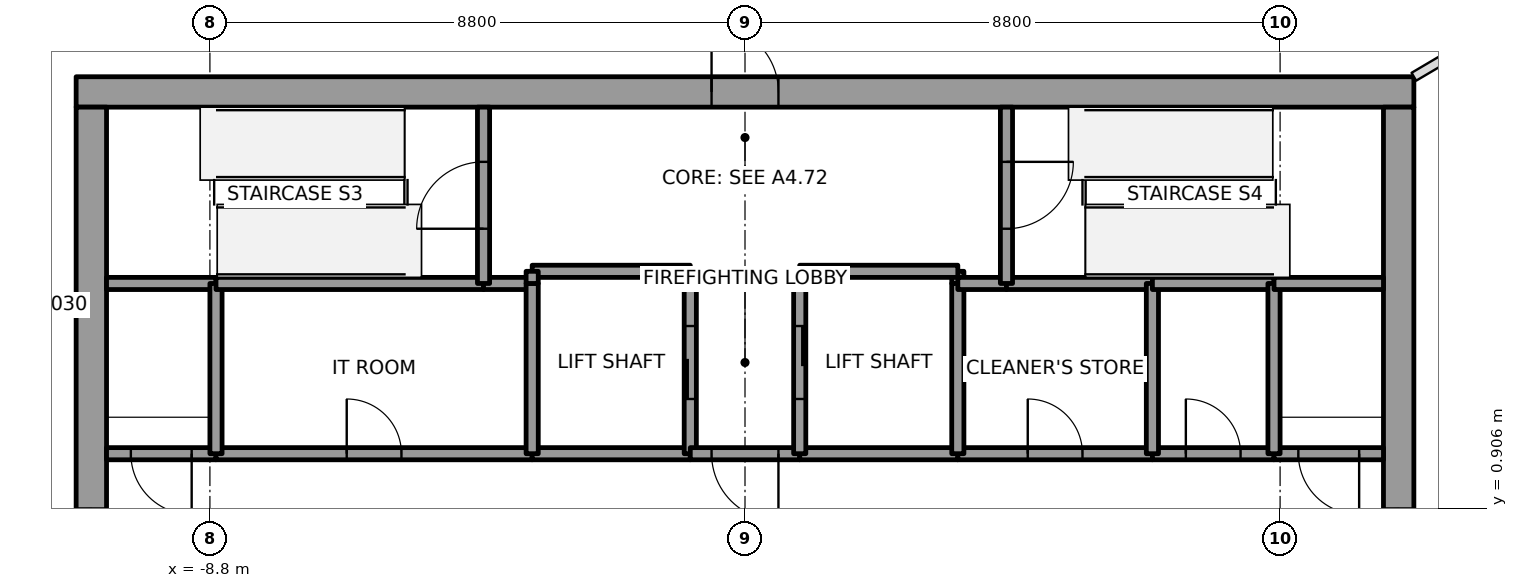
"""IFC4 building model, lengths in metres.
Left out: names, types, materials, properties, quantities, classifications, styles, units other than length and angle.
Written with IfcOpenShell. Run it as: python <this file> out.ifc"""

import sys

from ifc_helpers import new_model, si_unit, direction, frame, frame_2d, origin, place, context, subcontext, project, spatial, rectangle, extrude, element, fill, save


model = new_model("IFC4")
c1 = context("Model", 3, precision=1e-05, world=origin(), true_north=direction((0.0, 1.0)))
c2 = subcontext(c1, "Body", "Model", "MODEL_VIEW")
j1 = project(units=[si_unit("LENGTHUNIT", "METRE"), si_unit("PLANEANGLEUNIT", "RADIAN")], contexts=[c1])
p1 = place(None, origin())
s1 = spatial("IfcSite", under=j1, at=p1, CompositionType="ELEMENT")
p2 = place(p1, origin())
s2 = spatial("IfcBuilding", under=s1, at=p2, CompositionType="ELEMENT")
p3 = place(p2, frame((0.0, 0.0, 307.0)))
s3 = spatial("IfcBuildingStorey", under=s2, at=p3, CompositionType="ELEMENT", Elevation=307.0)
p4 = place(p3, frame((-11.0, 7.75, 0.0), z_axis=(0.0, 0.0, 1.0), x_axis=(1.0, 0.0, 0.0)))
e1 = element("IfcWall", 1, at=p4, inside=s3, PredefinedType="SHEAR", context=c2, shape_type="SweptSolid", body=[
    extrude(rectangle(XDim=22.0, YDim=0.5, at=frame_2d((11.0, 0.0))), origin(), (0.0, 0.0, 1.0), 4.0),
])
p5 = place(p4, frame((10.45, 0.0, 0.0)))
e2 = element("IfcOpeningElement", 2, at=p5, cuts=e1, PredefinedType="OPENING", context=c2, shape_type="SweptSolid", body=[
    extrude(rectangle(XDim=1.1, YDim=2.1, at=frame_2d((0.55, 1.05))), frame((0.0, 0.25, 0.0), z_axis=(0.0, -1.0, 0.0), x_axis=(1.0, 0.0, 0.0)), (0.0, 0.0, 1.0), 0.5),
])
p6 = place(p3, frame((-10.75, -7.5, 0.0), z_axis=(0.0, 0.0, 1.0), x_axis=(0.0, 1.0, 0.0)))
e3 = element("IfcWall", 3, at=p6, inside=s3, PredefinedType="SHEAR", context=c2, shape_type="SweptSolid", body=[
    extrude(rectangle(XDim=15.0, YDim=0.5, at=frame_2d((7.5, 0.0))), origin(), (0.0, 0.0, 1.0), 4.0),
])
p7 = place(p6, frame((6.6, 0.0, 0.0)))
e4 = element("IfcOpeningElement", 4, at=p7, cuts=e3, PredefinedType="OPENING", context=c2, shape_type="SweptSolid", body=[
    extrude(rectangle(XDim=1.8, YDim=2.1, at=frame_2d((0.9, 1.05))), frame((0.0, 0.25, 0.0), z_axis=(0.0, -1.0, 0.0), x_axis=(1.0, 0.0, 0.0)), (0.0, 0.0, 1.0), 0.5),
])
p8 = place(p3, frame((10.75, -7.5, 0.0), z_axis=(0.0, 0.0, 1.0), x_axis=(0.0, 1.0, 0.0)))
e5 = element("IfcWall", 5, at=p8, inside=s3, PredefinedType="SHEAR", context=c2, shape_type="SweptSolid", body=[
    extrude(rectangle(XDim=15.0, YDim=0.5, at=frame_2d((7.5, 0.0))), origin(), (0.0, 0.0, 1.0), 4.0),
])
p9 = place(p8, frame((6.6, 0.0, 0.0)))
e6 = element("IfcOpeningElement", 6, at=p9, cuts=e5, PredefinedType="OPENING", context=c2, shape_type="SweptSolid", body=[
    extrude(rectangle(XDim=1.8, YDim=2.1, at=frame_2d((0.9, 1.05))), frame((0.0, 0.25, 0.0), z_axis=(0.0, -1.0, 0.0), x_axis=(1.0, 0.0, 0.0)), (0.0, 0.0, 1.0), 0.5),
])
p10 = place(p3, frame((-8.7, 1.8, 0.0), z_axis=(0.0, 0.0, 1.0), x_axis=(-1.0, 0.0, 0.0)))
e7 = element("IfcWall", 7, at=p10, inside=s3, PredefinedType="SOLIDWALL", context=c2, shape_type="SweptSolid", body=[
    extrude(rectangle(XDim=1.8, YDim=0.2, at=frame_2d((0.9, 0.0))), origin(), (0.0, 0.0, 1.0), 3.85),
])
p11 = place(p10, frame((0.4, 0.0, 0.0)))
e8 = element("IfcOpeningElement", 8, at=p11, cuts=e7, PredefinedType="OPENING", context=c2, shape_type="SweptSolid", body=[
    extrude(rectangle(XDim=1.0, YDim=2.1, at=frame_2d((0.5, 1.05))), frame((0.0, 0.1, 0.0), z_axis=(0.0, -1.0, 0.0), x_axis=(1.0, 0.0, 0.0)), (0.0, 0.0, 1.0), 0.2),
])
p12 = place(p3, frame((-8.7, 4.6, 0.0), z_axis=(0.0, 0.0, 1.0), x_axis=(-1.0, 0.0, 0.0)))
e9 = element("IfcWall", 9, at=p12, inside=s3, PredefinedType="SOLIDWALL", context=c2, shape_type="SweptSolid", body=[
    extrude(rectangle(XDim=1.8, YDim=0.2, at=frame_2d((0.9, 0.0))), origin(), (0.0, 0.0, 1.0), 3.85),
])
p13 = place(p3, frame((-8.7, 1.8, 0.0), z_axis=(0.0, 0.0, 1.0), x_axis=(1.0, 0.0, 0.0)))
e10 = element("IfcWall", 10, at=p13, inside=s3, PredefinedType="SOLIDWALL", context=c2, shape_type="SweptSolid", body=[
    extrude(rectangle(XDim=5.2, YDim=0.2, at=frame_2d((2.6, 0.0))), origin(), (0.0, 0.0, 1.0), 3.85),
])
p14 = place(p13, frame((2.15, 0.0, 0.0)))
e11 = element("IfcOpeningElement", 11, at=p14, cuts=e10, PredefinedType="OPENING", context=c2, shape_type="SweptSolid", body=[
    extrude(rectangle(XDim=0.9, YDim=2.1, at=frame_2d((0.45, 1.05))), frame((0.0, 0.1, 0.0), z_axis=(0.0, -1.0, 0.0), x_axis=(1.0, 0.0, 0.0)), (0.0, 0.0, 1.0), 0.2),
])
p15 = place(p3, frame((-8.7, 4.6, 0.0), z_axis=(0.0, 0.0, 1.0), x_axis=(0.0, -1.0, 0.0)))
e12 = element("IfcWall", 12, at=p15, inside=s3, PredefinedType="SOLIDWALL", context=c2, shape_type="SweptSolid", body=[
    extrude(rectangle(XDim=2.8, YDim=0.2, at=frame_2d((1.4, 0.0))), origin(), (0.0, 0.0, 1.0), 3.85),
])
p16 = place(p3, frame((-4.3, 4.6, 0.0), z_axis=(0.0, 0.0, 1.0), x_axis=(-1.0, 0.0, 0.0)))
e13 = element("IfcWall", 13, at=p16, inside=s3, PredefinedType="SOLIDWALL", context=c2, shape_type="SweptSolid", body=[
    extrude(rectangle(XDim=4.4, YDim=0.2, at=frame_2d((2.2, 0.0))), origin(), (0.0, 0.0, 1.0), 3.85),
])
p17 = place(p3, frame((-3.5, 4.6, 0.0), z_axis=(0.0, 0.0, 1.0), x_axis=(-1.0, 0.0, 0.0)))
e14 = element("IfcWall", 14, at=p17, inside=s3, PredefinedType="SOLIDWALL", context=c2, shape_type="SweptSolid", body=[
    extrude(rectangle(XDim=0.8, YDim=0.2, at=frame_2d((0.4, 0.0))), origin(), (0.0, 0.0, 1.0), 3.85),
])
p18 = place(p3, frame((-4.3, 4.6, 0.0), z_axis=(0.0, 0.0, 1.0), x_axis=(0.0, 1.0, 0.0)))
e15 = element("IfcWall", 15, at=p18, inside=s3, PredefinedType="SOLIDWALL", context=c2, shape_type="SweptSolid", body=[
    extrude(rectangle(XDim=2.9, YDim=0.2, at=frame_2d((1.45, 0.0))), origin(), (0.0, 0.0, 1.0), 3.85),
])
p19 = place(p18, frame((0.9, 0.0, 0.0)))
e16 = element("IfcOpeningElement", 16, at=p19, cuts=e15, PredefinedType="OPENING", context=c2, shape_type="SweptSolid", body=[
    extrude(rectangle(XDim=1.1, YDim=2.1, at=frame_2d((0.55, 1.05))), frame((0.0, 0.1, 0.0), z_axis=(0.0, -1.0, 0.0), x_axis=(1.0, 0.0, 0.0)), (0.0, 0.0, 1.0), 0.2),
])
p20 = place(p3, frame((-0.9, 1.8, 0.0), z_axis=(0.0, 0.0, 1.0), x_axis=(-1.0, 0.0, 0.0)))
e17 = element("IfcWall", 17, at=p20, inside=s3, PredefinedType="SOLIDWALL", context=c2, shape_type="SweptSolid", body=[
    extrude(rectangle(XDim=2.6, YDim=0.2, at=frame_2d((1.3, 0.0))), origin(), (0.0, 0.0, 1.0), 3.85),
])
p21 = place(p3, frame((-3.5, 1.8, 0.0), z_axis=(0.0, 0.0, 1.0), x_axis=(0.0, 1.0, 0.0)))
e18 = element("IfcWall", 18, at=p21, inside=s3, PredefinedType="SOLIDWALL", context=c2, shape_type="SweptSolid", body=[
    extrude(rectangle(XDim=2.8, YDim=0.2, at=frame_2d((1.4, 0.0))), origin(), (0.0, 0.0, 1.0), 3.85),
])
p22 = place(p3, frame((-0.9, 1.8, 0.0), z_axis=(0.0, 0.0, 1.0), x_axis=(0.0, 1.0, 0.0)))
e19 = element("IfcWall", 19, at=p22, inside=s3, PredefinedType="SOLIDWALL", context=c2, shape_type="SweptSolid", body=[
    extrude(rectangle(XDim=3.0, YDim=0.2, at=frame_2d((1.5, 0.0))), origin(), (0.0, 0.0, 1.0), 3.85),
])
p23 = place(p22, frame((0.9, 0.0, 0.0)))
e20 = element("IfcOpeningElement", 20, at=p23, cuts=e19, PredefinedType="OPENING", context=c2, shape_type="SweptSolid", body=[
    extrude(rectangle(XDim=1.2, YDim=2.1, at=frame_2d((0.6, 1.05))), frame((0.0, 0.1, 0.0), z_axis=(0.0, -1.0, 0.0), x_axis=(1.0, 0.0, 0.0)), (0.0, 0.0, 1.0), 0.2),
])
p24 = place(p3, frame((-0.9, 4.8, 0.0), z_axis=(0.0, 0.0, 1.0), x_axis=(-1.0, 0.0, 0.0)))
e21 = element("IfcWall", 21, at=p24, inside=s3, PredefinedType="SOLIDWALL", context=c2, shape_type="SweptSolid", body=[
    extrude(rectangle(XDim=2.6, YDim=0.2, at=frame_2d((1.3, 0.0))), origin(), (0.0, 0.0, 1.0), 3.85),
])
p25 = place(p3, frame((-3.5, 4.8, 0.0), z_axis=(0.0, 0.0, 1.0), x_axis=(0.0, -1.0, 0.0)))
e22 = element("IfcWall", 22, at=p25, inside=s3, PredefinedType="SOLIDWALL", context=c2, shape_type="SweptSolid", body=[
    extrude(rectangle(XDim=0.2, YDim=0.2, at=frame_2d((0.1, 0.0))), origin(), (0.0, 0.0, 1.0), 3.85),
])
p26 = place(p3, frame((0.9, 1.8, 0.0), z_axis=(0.0, 0.0, 1.0), x_axis=(-1.0, 0.0, 0.0)))
e23 = element("IfcWall", 23, at=p26, inside=s3, PredefinedType="SOLIDWALL", context=c2, shape_type="SweptSolid", body=[
    extrude(rectangle(XDim=1.8, YDim=0.2, at=frame_2d((0.9, 0.0))), origin(), (0.0, 0.0, 1.0), 3.85),
])
p27 = place(p26, frame((0.35, 0.0, 0.0)))
e24 = element("IfcOpeningElement", 24, at=p27, cuts=e23, PredefinedType="OPENING", context=c2, shape_type="SweptSolid", body=[
    extrude(rectangle(XDim=1.1, YDim=2.1, at=frame_2d((0.55, 1.05))), frame((0.0, 0.1, 0.0), z_axis=(0.0, -1.0, 0.0), x_axis=(1.0, 0.0, 0.0)), (0.0, 0.0, 1.0), 0.2),
])
p28 = place(p3, frame((3.5, 1.8, 0.0), z_axis=(0.0, 0.0, 1.0), x_axis=(-1.0, 0.0, 0.0)))
e25 = element("IfcWall", 25, at=p28, inside=s3, PredefinedType="SOLIDWALL", context=c2, shape_type="SweptSolid", body=[
    extrude(rectangle(XDim=2.6, YDim=0.2, at=frame_2d((1.3, 0.0))), origin(), (0.0, 0.0, 1.0), 3.85),
])
p29 = place(p3, frame((3.5, 4.6, 0.0), z_axis=(0.0, 0.0, 1.0), x_axis=(0.0, 1.0, 0.0)))
e26 = element("IfcWall", 26, at=p29, inside=s3, PredefinedType="SOLIDWALL", context=c2, shape_type="SweptSolid", body=[
    extrude(rectangle(XDim=0.2, YDim=0.2, at=frame_2d((0.1, 0.0))), origin(), (0.0, 0.0, 1.0), 3.85),
])
p30 = place(p3, frame((3.5, 4.8, 0.0), z_axis=(0.0, 0.0, 1.0), x_axis=(-1.0, 0.0, 0.0)))
e27 = element("IfcWall", 27, at=p30, inside=s3, PredefinedType="SOLIDWALL", context=c2, shape_type="SweptSolid", body=[
    extrude(rectangle(XDim=2.6, YDim=0.2, at=frame_2d((1.3, 0.0))), origin(), (0.0, 0.0, 1.0), 3.85),
])
p31 = place(p3, frame((0.9, 4.8, 0.0), z_axis=(0.0, 0.0, 1.0), x_axis=(0.0, -1.0, 0.0)))
e28 = element("IfcWall", 28, at=p31, inside=s3, PredefinedType="SOLIDWALL", context=c2, shape_type="SweptSolid", body=[
    extrude(rectangle(XDim=3.0, YDim=0.2, at=frame_2d((1.5, 0.0))), origin(), (0.0, 0.0, 1.0), 3.85),
])
p32 = place(p31, frame((0.9, 0.0, 0.0)))
e29 = element("IfcOpeningElement", 29, at=p32, cuts=e28, PredefinedType="OPENING", context=c2, shape_type="SweptSolid", body=[
    extrude(rectangle(XDim=1.2, YDim=2.1, at=frame_2d((0.6, 1.05))), frame((0.0, 0.1, 0.0), z_axis=(0.0, -1.0, 0.0), x_axis=(1.0, 0.0, 0.0)), (0.0, 0.0, 1.0), 0.2),
])
p33 = place(p3, frame((3.5, 1.8, 0.0), z_axis=(0.0, 0.0, 1.0), x_axis=(1.0, 0.0, 0.0)))
e30 = element("IfcWall", 30, at=p33, inside=s3, PredefinedType="SOLIDWALL", context=c2, shape_type="SweptSolid", body=[
    extrude(rectangle(XDim=3.2, YDim=0.2, at=frame_2d((1.6, 0.0))), origin(), (0.0, 0.0, 1.0), 3.85),
])
p34 = place(p33, frame((1.15, 0.0, 0.0)))
e31 = element("IfcOpeningElement", 31, at=p34, cuts=e30, PredefinedType="OPENING", context=c2, shape_type="SweptSolid", body=[
    extrude(rectangle(XDim=0.9, YDim=2.1, at=frame_2d((0.45, 1.05))), frame((0.0, 0.1, 0.0), z_axis=(0.0, -1.0, 0.0), x_axis=(1.0, 0.0, 0.0)), (0.0, 0.0, 1.0), 0.2),
])
p35 = place(p3, frame((3.5, 4.6, 0.0), z_axis=(0.0, 0.0, 1.0), x_axis=(0.0, -1.0, 0.0)))
e32 = element("IfcWall", 32, at=p35, inside=s3, PredefinedType="SOLIDWALL", context=c2, shape_type="SweptSolid", body=[
    extrude(rectangle(XDim=2.8, YDim=0.2, at=frame_2d((1.4, 0.0))), origin(), (0.0, 0.0, 1.0), 3.85),
])
p36 = place(p3, frame((4.3, 4.6, 0.0), z_axis=(0.0, 0.0, 1.0), x_axis=(-1.0, 0.0, 0.0)))
e33 = element("IfcWall", 33, at=p36, inside=s3, PredefinedType="SOLIDWALL", context=c2, shape_type="SweptSolid", body=[
    extrude(rectangle(XDim=0.8, YDim=0.2, at=frame_2d((0.4, 0.0))), origin(), (0.0, 0.0, 1.0), 3.85),
])
p37 = place(p3, frame((6.7, 4.6, 0.0), z_axis=(0.0, 0.0, 1.0), x_axis=(-1.0, 0.0, 0.0)))
e34 = element("IfcWall", 34, at=p37, inside=s3, PredefinedType="SOLIDWALL", context=c2, shape_type="SweptSolid", body=[
    extrude(rectangle(XDim=2.4, YDim=0.2, at=frame_2d((1.2, 0.0))), origin(), (0.0, 0.0, 1.0), 3.85),
])
p38 = place(p3, frame((4.3, 7.5, 0.0), z_axis=(0.0, 0.0, 1.0), x_axis=(0.0, -1.0, 0.0)))
e35 = element("IfcWall", 35, at=p38, inside=s3, PredefinedType="SOLIDWALL", context=c2, shape_type="SweptSolid", body=[
    extrude(rectangle(XDim=2.9, YDim=0.2, at=frame_2d((1.45, 0.0))), origin(), (0.0, 0.0, 1.0), 3.85),
])
p39 = place(p38, frame((0.9, 0.0, 0.0)))
e36 = element("IfcOpeningElement", 36, at=p39, cuts=e35, PredefinedType="OPENING", context=c2, shape_type="SweptSolid", body=[
    extrude(rectangle(XDim=1.1, YDim=2.1, at=frame_2d((0.55, 1.05))), frame((0.0, 0.1, 0.0), z_axis=(0.0, -1.0, 0.0), x_axis=(1.0, 0.0, 0.0)), (0.0, 0.0, 1.0), 0.2),
])
p40 = place(p3, frame((6.7, 1.8, 0.0), z_axis=(0.0, 0.0, 1.0), x_axis=(1.0, 0.0, 0.0)))
e37 = element("IfcWall", 37, at=p40, inside=s3, PredefinedType="SOLIDWALL", context=c2, shape_type="SweptSolid", body=[
    extrude(rectangle(XDim=2.0, YDim=0.2, at=frame_2d((1.0, 0.0))), origin(), (0.0, 0.0, 1.0), 3.85),
])
p41 = place(p40, frame((0.55, 0.0, 0.0)))
e38 = element("IfcOpeningElement", 38, at=p41, cuts=e37, PredefinedType="OPENING", context=c2, shape_type="SweptSolid", body=[
    extrude(rectangle(XDim=0.9, YDim=2.1, at=frame_2d((0.45, 1.05))), frame((0.0, 0.1, 0.0), z_axis=(0.0, -1.0, 0.0), x_axis=(1.0, 0.0, 0.0)), (0.0, 0.0, 1.0), 0.2),
])
p42 = place(p3, frame((6.7, 1.8, 0.0), z_axis=(0.0, 0.0, 1.0), x_axis=(0.0, 1.0, 0.0)))
e39 = element("IfcWall", 39, at=p42, inside=s3, PredefinedType="SOLIDWALL", context=c2, shape_type="SweptSolid", body=[
    extrude(rectangle(XDim=2.8, YDim=0.2, at=frame_2d((1.4, 0.0))), origin(), (0.0, 0.0, 1.0), 3.85),
])
p43 = place(p3, frame((8.7, 4.6, 0.0), z_axis=(0.0, 0.0, 1.0), x_axis=(-1.0, 0.0, 0.0)))
e40 = element("IfcWall", 40, at=p43, inside=s3, PredefinedType="SOLIDWALL", context=c2, shape_type="SweptSolid", body=[
    extrude(rectangle(XDim=2.0, YDim=0.2, at=frame_2d((1.0, 0.0))), origin(), (0.0, 0.0, 1.0), 3.85),
])
p44 = place(p3, frame((10.5, 1.8, 0.0), z_axis=(0.0, 0.0, 1.0), x_axis=(-1.0, 0.0, 0.0)))
e41 = element("IfcWall", 41, at=p44, inside=s3, PredefinedType="SOLIDWALL", context=c2, shape_type="SweptSolid", body=[
    extrude(rectangle(XDim=1.8, YDim=0.2, at=frame_2d((0.9, 0.0))), origin(), (0.0, 0.0, 1.0), 3.85),
])
p45 = place(p44, frame((0.4, 0.0, 0.0)))
e42 = element("IfcOpeningElement", 42, at=p45, cuts=e41, PredefinedType="OPENING", context=c2, shape_type="SweptSolid", body=[
    extrude(rectangle(XDim=1.0, YDim=2.1, at=frame_2d((0.5, 1.05))), frame((0.0, 0.1, 0.0), z_axis=(0.0, -1.0, 0.0), x_axis=(1.0, 0.0, 0.0)), (0.0, 0.0, 1.0), 0.2),
])
p46 = place(p3, frame((8.7, 1.8, 0.0), z_axis=(0.0, 0.0, 1.0), x_axis=(0.0, 1.0, 0.0)))
e43 = element("IfcWall", 43, at=p46, inside=s3, PredefinedType="SOLIDWALL", context=c2, shape_type="SweptSolid", body=[
    extrude(rectangle(XDim=2.8, YDim=0.2, at=frame_2d((1.4, 0.0))), origin(), (0.0, 0.0, 1.0), 3.85),
])
p47 = place(p3, frame((10.5, 4.6, 0.0), z_axis=(0.0, 0.0, 1.0), x_axis=(-1.0, 0.0, 0.0)))
e44 = element("IfcWall", 44, at=p47, inside=s3, PredefinedType="SOLIDWALL", context=c2, shape_type="SweptSolid", body=[
    extrude(rectangle(XDim=1.8, YDim=0.2, at=frame_2d((0.9, 0.0))), origin(), (0.0, 0.0, 1.0), 3.85),
])
p48 = place(p3, frame((11.0, 8.0, 0.0), z_axis=(0.0, 0.0, 1.0), x_axis=(0.861341454675, 0.508026474171, 0.0)))
e45 = element("IfcWall", 45, at=p48, inside=s3, PredefinedType="PARTITIONING", context=c2, shape_type="SweptSolid", body=[
    extrude(rectangle(XDim=0.784, YDim=0.15, at=frame_2d((0.392, 0.0))), origin(), (0.0, 0.0, 1.0), 3.45),
])
p49 = place(p23, origin())
e46 = element("IfcDoor", 46, at=p49, inside=s3, OperationType="SLIDING_TO_LEFT", PredefinedType="DOOR", context=c2, shape_type="SweptSolid", body=[
    extrude(rectangle(XDim=1.2, YDim=2.1, at=frame_2d((0.6, 1.05))), frame((0.0, 0.025, 0.0), z_axis=(0.0, -1.0, 0.0), x_axis=(1.0, 0.0, 0.0)), (0.0, 0.0, 1.0), 0.05),
])
fill(e20, e46)
p50 = place(p32, origin())
e47 = element("IfcDoor", 47, at=p50, inside=s3, OperationType="SLIDING_TO_RIGHT", PredefinedType="DOOR", context=c2, shape_type="SweptSolid", body=[
    extrude(rectangle(XDim=1.2, YDim=2.1, at=frame_2d((0.6, 1.05))), frame((0.0, 0.025, 0.0), z_axis=(0.0, -1.0, 0.0), x_axis=(1.0, 0.0, 0.0)), (0.0, 0.0, 1.0), 0.05),
])
fill(e29, e47)
p51 = place(p27, origin())
e48 = element("IfcDoor", 48, at=p51, inside=s3, OperationType="SINGLE_SWING_LEFT", PredefinedType="DOOR", context=c2, shape_type="SweptSolid", body=[
    extrude(rectangle(XDim=1.1, YDim=2.1, at=frame_2d((0.55, 1.05))), frame((0.0, 0.025, 0.0), z_axis=(0.0, -1.0, 0.0), x_axis=(1.0, 0.0, 0.0)), (0.0, 0.0, 1.0), 0.05),
])
fill(e24, e48)
p52 = place(p11, origin())
e49 = element("IfcDoor", 49, at=p52, inside=s3, OperationType="SINGLE_SWING_LEFT", PredefinedType="DOOR", context=c2, shape_type="SweptSolid", body=[
    extrude(rectangle(XDim=1.0, YDim=2.1, at=frame_2d((0.5, 1.05))), frame((0.0, 0.025, 0.0), z_axis=(0.0, -1.0, 0.0), x_axis=(1.0, 0.0, 0.0)), (0.0, 0.0, 1.0), 0.05),
])
fill(e8, e49)
p53 = place(p45, origin())
e50 = element("IfcDoor", 50, at=p53, inside=s3, OperationType="SINGLE_SWING_LEFT", PredefinedType="DOOR", context=c2, shape_type="SweptSolid", body=[
    extrude(rectangle(XDim=1.0, YDim=2.1, at=frame_2d((0.5, 1.05))), frame((0.0, 0.025, 0.0), z_axis=(0.0, -1.0, 0.0), x_axis=(1.0, 0.0, 0.0)), (0.0, 0.0, 1.0), 0.05),
])
fill(e42, e50)
p54 = place(p19, origin())
e51 = element("IfcDoor", 51, at=p54, inside=s3, OperationType="SINGLE_SWING_RIGHT", PredefinedType="DOOR", context=c2, shape_type="SweptSolid", body=[
    extrude(rectangle(XDim=1.1, YDim=2.1, at=frame_2d((0.55, 1.05))), frame((0.0, 0.025, 0.0), z_axis=(0.0, -1.0, 0.0), x_axis=(1.0, 0.0, 0.0)), (0.0, 0.0, 1.0), 0.05),
])
fill(e16, e51)
p55 = place(p39, origin())
e52 = element("IfcDoor", 52, at=p55, inside=s3, OperationType="SINGLE_SWING_LEFT", PredefinedType="DOOR", context=c2, shape_type="SweptSolid", body=[
    extrude(rectangle(XDim=1.1, YDim=2.1, at=frame_2d((0.55, 1.05))), frame((0.0, 0.025, 0.0), z_axis=(0.0, -1.0, 0.0), x_axis=(1.0, 0.0, 0.0)), (0.0, 0.0, 1.0), 0.05),
])
fill(e36, e52)
p56 = place(p34, origin())
e53 = element("IfcDoor", 53, at=p56, inside=s3, OperationType="SINGLE_SWING_RIGHT", PredefinedType="DOOR", context=c2, shape_type="SweptSolid", body=[
    extrude(rectangle(XDim=0.9, YDim=2.1, at=frame_2d((0.45, 1.05))), frame((0.0, 0.025, 0.0), z_axis=(0.0, -1.0, 0.0), x_axis=(1.0, 0.0, 0.0)), (0.0, 0.0, 1.0), 0.05),
])
fill(e31, e53)
p57 = place(p41, origin())
e54 = element("IfcDoor", 54, at=p57, inside=s3, OperationType="SINGLE_SWING_LEFT", PredefinedType="DOOR", context=c2, shape_type="SweptSolid", body=[
    extrude(rectangle(XDim=0.9, YDim=2.1, at=frame_2d((0.45, 1.05))), frame((0.0, 0.025, 0.0), z_axis=(0.0, -1.0, 0.0), x_axis=(1.0, 0.0, 0.0)), (0.0, 0.0, 1.0), 0.05),
])
fill(e38, e54)
p58 = place(p14, origin())
e55 = element("IfcDoor", 55, at=p58, inside=s3, OperationType="SINGLE_SWING_LEFT", PredefinedType="DOOR", context=c2, shape_type="SweptSolid", body=[
    extrude(rectangle(XDim=0.9, YDim=2.1, at=frame_2d((0.45, 1.05))), frame((0.0, 0.025, 0.0), z_axis=(0.0, -1.0, 0.0), x_axis=(1.0, 0.0, 0.0)), (0.0, 0.0, 1.0), 0.05),
])
fill(e11, e55)
p59 = place(p7, origin())
e56 = element("IfcDoor", 56, at=p59, inside=s3, OperationType="DOUBLE_DOOR_SINGLE_SWING", PredefinedType="DOOR", context=c2, shape_type="SweptSolid", body=[
    extrude(rectangle(XDim=1.8, YDim=2.1, at=frame_2d((0.9, 1.05))), frame((0.0, 0.025, 0.0), z_axis=(0.0, -1.0, 0.0), x_axis=(1.0, 0.0, 0.0)), (0.0, 0.0, 1.0), 0.05),
])
fill(e4, e56)
p60 = place(p9, origin())
e57 = element("IfcDoor", 57, at=p60, inside=s3, OperationType="DOUBLE_DOOR_SINGLE_SWING", PredefinedType="DOOR", context=c2, shape_type="SweptSolid", body=[
    extrude(rectangle(XDim=1.8, YDim=2.1, at=frame_2d((0.9, 1.05))), frame((0.0, 0.025, 0.0), z_axis=(0.0, -1.0, 0.0), x_axis=(1.0, 0.0, 0.0)), (0.0, 0.0, 1.0), 0.05),
])
fill(e6, e57)
p61 = place(p5, origin())
e58 = element("IfcDoor", 58, at=p61, inside=s3, OperationType="SINGLE_SWING_LEFT", PredefinedType="DOOR", context=c2, shape_type="SweptSolid", body=[
    extrude(rectangle(XDim=1.1, YDim=2.1, at=frame_2d((0.55, 1.05))), frame((0.0, 0.025, 0.0), z_axis=(0.0, -1.0, 0.0), x_axis=(1.0, 0.0, 0.0)), (0.0, 0.0, 1.0), 0.05),
])
fill(e2, e58)
save(model, sys.argv[1])
